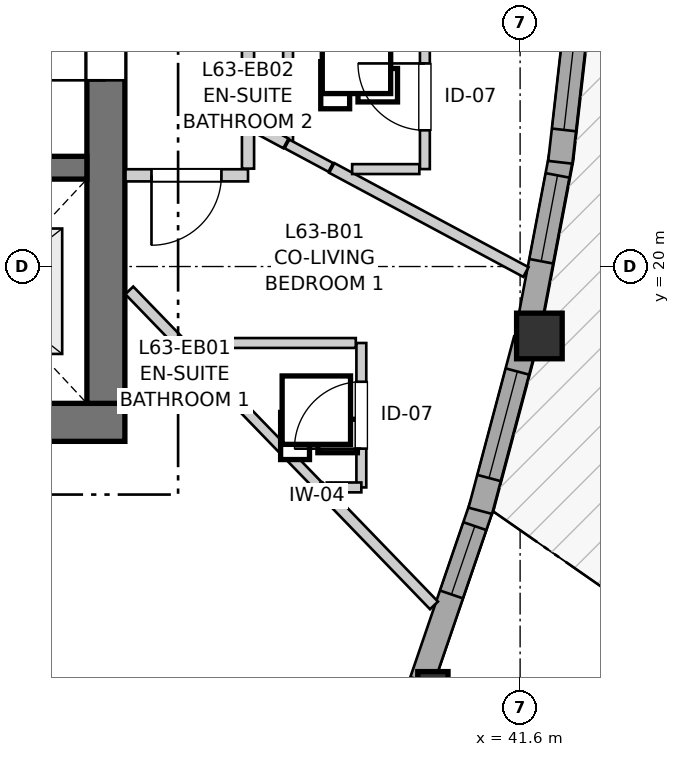
"""IFC4 building model, lengths in metres.
Left out: names, types, materials, properties, quantities, classifications, styles, units other than length and angle.
Written with IfcOpenShell. Run it as: python <this file> out.ifc"""

import sys

from ifc_helpers import new_model, si_unit, direction, frame, frame_2d, origin, origin_2d, place, context, subcontext, project, spatial, rectangle, i_section, extrude, source, transform, mapped, element, fill, save


model = new_model("IFC4")
c1 = context("Model", 3, precision=1e-05, world=origin(), true_north=direction((0.0, 1.0)))
c2 = subcontext(c1, "Body", "Model", "MODEL_VIEW")
j1 = project(units=[si_unit("LENGTHUNIT", "METRE"), si_unit("PLANEANGLEUNIT", "RADIAN")], contexts=[c1])
p1 = place(None, origin())
s1 = spatial("IfcSite", under=j1, at=p1, CompositionType="ELEMENT")
p2 = place(p1, origin())
s2 = spatial("IfcBuilding", under=s1, at=p2, CompositionType="ELEMENT")
p3 = place(p2, frame((0.0, 0.0, 211.6)))
s3 = spatial("IfcBuildingStorey", under=s2, at=p3, CompositionType="ELEMENT", Elevation=211.6)
p4 = place(p3, frame((24.3, 17.95, 0.0), z_axis=(0.0, 0.0, 1.0), x_axis=(1.0, 0.0, 0.0)))
e1 = element("IfcWall", 1, at=p4, inside=s3, PredefinedType="SHEAR", context=c2, shape_type="SweptSolid", body=[
    extrude(rectangle(XDim=12.1, YDim=0.5, at=frame_2d((6.05, 0.0))), origin(), (0.0, 0.0, 1.0), 2.96),
])
p5 = place(p3, frame((36.15, 18.2, 0.0), z_axis=(0.0, 0.0, 1.0), x_axis=(0.0, 1.0, 0.0)))
e2 = element("IfcWall", 2, at=p5, inside=s3, PredefinedType="SHEAR", context=c2, shape_type="SweptSolid", body=[
    extrude(rectangle(XDim=15.6, YDim=0.5, at=frame_2d((7.8, 0.0))), origin(), (0.0, 0.0, 1.0), 2.96),
])
p6 = place(p5, frame((4.25, 0.0, 0.0)))
e3 = element("IfcOpeningElement", 3, at=p6, cuts=e2, PredefinedType="OPENING", context=c2, shape_type="SweptSolid", body=[
    extrude(rectangle(XDim=1.1, YDim=2.15, at=frame_2d((0.55, 1.075))), frame((0.0, 0.26, 0.0), z_axis=(0.0, -1.0, 0.0), x_axis=(1.0, 0.0, 0.0)), (0.0, 0.0, 1.0), 0.52),
])
p7 = place(p5, frame((10.25, 0.0, 0.0)))
e4 = element("IfcOpeningElement", 4, at=p7, cuts=e2, PredefinedType="OPENING", context=c2, shape_type="SweptSolid", body=[
    extrude(rectangle(XDim=1.1, YDim=2.15, at=frame_2d((0.55, 1.075))), frame((0.0, 0.26, 0.0), z_axis=(0.0, -1.0, 0.0), x_axis=(1.0, 0.0, 0.0)), (0.0, 0.0, 1.0), 0.52),
])
p8 = place(p3, frame((24.8, 21.3, 0.0), z_axis=(0.0, 0.0, 1.0), x_axis=(1.0, 0.0, 0.0)))
e5 = element("IfcWall", 5, at=p8, inside=s3, PredefinedType="SHEAR", context=c2, shape_type="SweptSolid", body=[
    extrude(rectangle(XDim=11.1, YDim=0.3, at=frame_2d((5.55, 0.0))), origin(), (0.0, 0.0, 1.0), 2.96),
])
p9 = place(p8, frame((6.22, 0.0, 0.0)))
e6 = element("IfcOpeningElement", 6, at=p9, cuts=e5, PredefinedType="OPENING", context=c2, shape_type="SweptSolid", body=[
    extrude(rectangle(XDim=0.98, YDim=2.15, at=frame_2d((0.49, 1.075))), frame((0.0, 0.16, 0.0), z_axis=(0.0, -1.0, 0.0), x_axis=(1.0, 0.0, 0.0)), (0.0, 0.0, 1.0), 0.32),
])
p10 = place(p8, frame((9.15, 0.0, 0.0)))
e7 = element("IfcOpeningElement", 7, at=p10, cuts=e5, PredefinedType="OPENING", context=c2, shape_type="SweptSolid", body=[
    extrude(rectangle(XDim=1.15, YDim=2.15, at=frame_2d((0.575, 1.075))), frame((0.0, 0.16, 0.0), z_axis=(0.0, -1.0, 0.0), x_axis=(1.0, 0.0, 0.0)), (0.0, 0.0, 1.0), 0.32),
])
m1 = source(origin(), c2, "Body", "SweptSolid", [
    extrude(i_section(OverallWidth=0.398, OverallDepth=0.387, WebThickness=0.019, FlangeThickness=0.03, FilletRadius=0.015, at=origin_2d()), origin(), (0.0, 0.0, 1.0), 2.96),
])
p11 = place(p3, frame((40.452, 14.478, 0.0), z_axis=(0.0, 0.0, 1.0), x_axis=(1.0, 0.0, 0.0)))
e8 = element("IfcColumn", 8, at=p11, inside=s3, PredefinedType="PILASTER", context=c2, shape_type="MappedRepresentation", body=[
    mapped(m1, transform((0.0, 0.0, 0.0), x_axis=(1.0, 0.0, 0.0), y_axis=(0.0, 1.0, 0.0), z_axis=(0.0, 0.0, 1.0), scale=1.0)),
])
m2 = source(origin(), c2, "Body", "SweptSolid", [
    extrude(rectangle(XDim=0.6, YDim=0.6, at=origin_2d()), origin(), (0.0, 0.0, 1.0), 2.96),
])
p12 = place(p3, frame((41.854, 19.086, 0.0), z_axis=(0.0, 0.0, 1.0), x_axis=(1.0, 0.0, 0.0)))
e9 = element("IfcColumn", 9, at=p12, inside=s3, PredefinedType="COLUMN", context=c2, shape_type="MappedRepresentation", body=[
    mapped(m2, transform((0.0, 0.0, 0.0), x_axis=(1.0, 0.0, 0.0), y_axis=(0.0, 1.0, 0.0), z_axis=(0.0, 0.0, 1.0), scale=1.0)),
])
p13 = place(p3, frame((40.308, 14.548, 0.0), z_axis=(0.0, 0.0, 1.0), x_axis=(0.323591564922, 0.946196860654, 0.0)))
e10 = element("IfcWall", 10, at=p13, inside=s3, PredefinedType="SOLIDWALL", context=c2, shape_type="SweptSolid", body=[
    extrude(rectangle(XDim=2.454, YDim=0.32, at=frame_2d((1.227, 0.0))), origin(), (0.0, 0.0, 1.0), 2.58),
])
p14 = place(p13, frame((1.202, 0.0, 0.82)))
e11 = element("IfcOpeningElement", 11, at=p14, cuts=e10, PredefinedType="OPENING", context=c2, shape_type="SweptSolid", body=[
    extrude(rectangle(XDim=0.95, YDim=1.35, at=frame_2d((0.475, 0.675))), frame((0.0, 0.17, 0.0), z_axis=(0.0, -1.0, 0.0), x_axis=(1.0, 0.0, 0.0)), (0.0, 0.0, 1.0), 0.34),
])
p15 = place(p3, frame((41.076, 16.786, 0.0), z_axis=(0.0, 0.0, 1.0), x_axis=(0.257037260973, 0.966401493413, 0.0)))
e12 = element("IfcWall", 12, at=p15, inside=s3, PredefinedType="SOLIDWALL", context=c2, shape_type="SweptSolid", body=[
    extrude(rectangle(XDim=2.333, YDim=0.32, at=frame_2d((1.167, 0.0))), origin(), (0.0, 0.0, 1.0), 2.58),
])
p16 = place(p15, frame((0.446, 0.0, 0.82)))
e13 = element("IfcOpeningElement", 13, at=p16, cuts=e12, PredefinedType="OPENING", context=c2, shape_type="SweptSolid", body=[
    extrude(rectangle(XDim=1.45, YDim=1.25, at=frame_2d((0.725, 0.625))), frame((0.0, 0.17, 0.0), z_axis=(0.0, -1.0, 0.0), x_axis=(1.0, 0.0, 0.0)), (0.0, 0.0, 1.0), 0.34),
])
p17 = place(p3, frame((41.713, 19.205, 0.0), z_axis=(0.0, 0.0, 1.0), x_axis=(0.186691464441, 0.982418595663, 0.0)))
e14 = element("IfcWall", 14, at=p17, inside=s3, PredefinedType="SOLIDWALL", context=c2, shape_type="SweptSolid", body=[
    extrude(rectangle(XDim=2.294, YDim=0.32, at=frame_2d((1.147, 0.0))), origin(), (0.0, 0.0, 1.0), 2.58),
])
p18 = place(p17, frame((0.88, 0.0, 0.82)))
e15 = element("IfcOpeningElement", 15, at=p18, cuts=e14, PredefinedType="OPENING", context=c2, shape_type="SweptSolid", body=[
    extrude(rectangle(XDim=1.15, YDim=1.2, at=frame_2d((0.575, 0.6))), frame((0.0, 0.17, 0.0), z_axis=(0.0, -1.0, 0.0), x_axis=(1.0, 0.0, 0.0)), (0.0, 0.0, 1.0), 0.34),
])
p19 = place(p3, frame((42.128, 21.371, 0.0), z_axis=(0.0, 0.0, 1.0), x_axis=(0.113319777802, 0.993558567956, 0.0)))
e16 = element("IfcWall", 16, at=p19, inside=s3, PredefinedType="SOLIDWALL", context=c2, shape_type="SweptSolid", body=[
    extrude(rectangle(XDim=2.338, YDim=0.32, at=frame_2d((1.169, 0.0))), origin(), (0.0, 0.0, 1.0), 2.58),
])
p20 = place(p19, frame((0.429, 0.0, 0.82)))
e17 = element("IfcOpeningElement", 17, at=p20, cuts=e16, PredefinedType="OPENING", context=c2, shape_type="SweptSolid", body=[
    extrude(rectangle(XDim=1.5, YDim=1.45, at=frame_2d((0.75, 0.725))), frame((0.0, 0.17, 0.0), z_axis=(0.0, -1.0, 0.0), x_axis=(1.0, 0.0, 0.0)), (0.0, 0.0, 1.0), 0.34),
])
p21 = place(p3, frame((38.02, 25.733, 0.0), z_axis=(0.0, 0.0, 1.0), x_axis=(0.0, -1.0, 0.0)))
e18 = element("IfcWall", 18, at=p21, inside=s3, PredefinedType="PARTITIONING", context=c2, shape_type="SweptSolid", body=[
    extrude(rectangle(XDim=3.862, YDim=0.16, at=frame_2d((1.931, 0.0))), origin(), (0.0, 0.0, 1.0), 2.96),
])
p22 = place(p21, frame((1.47, 0.0, 0.0)))
e19 = element("IfcOpeningElement", 19, at=p22, cuts=e18, PredefinedType="OPENING", context=c2, shape_type="SweptSolid", body=[
    extrude(rectangle(XDim=0.92, YDim=2.1, at=frame_2d((0.46, 1.05))), frame((0.0, 0.09, 0.0), z_axis=(0.0, -1.0, 0.0), x_axis=(1.0, 0.0, 0.0)), (0.0, 0.0, 1.0), 0.18),
])
p23 = place(p3, frame((39.511, 17.094, 0.0), z_axis=(0.0, 0.0, 1.0), x_axis=(0.0, 1.0, 0.0)))
e20 = element("IfcWall", 20, at=p23, inside=s3, PredefinedType="PARTITIONING", context=c2, shape_type="SweptSolid", body=[
    extrude(rectangle(XDim=1.9, YDim=0.13, at=frame_2d((0.95, 0.0))), origin(), (0.0, 0.0, 1.0), 2.96),
])
p24 = place(p23, frame((0.51, 0.0, 0.0)))
e21 = element("IfcOpeningElement", 21, at=p24, cuts=e20, PredefinedType="OPENING", context=c2, shape_type="SweptSolid", body=[
    extrude(rectangle(XDim=0.88, YDim=2.05, at=frame_2d((0.44, 1.025))), frame((0.0, 0.075, 0.0), z_axis=(0.0, -1.0, 0.0), x_axis=(1.0, 0.0, 0.0)), (0.0, 0.0, 1.0), 0.15),
])
p25 = place(p3, frame((40.347, 21.282, 0.0), z_axis=(0.0, 0.0, 1.0), x_axis=(0.0, 1.0, 0.0)))
e22 = element("IfcWall", 22, at=p25, inside=s3, PredefinedType="PARTITIONING", context=c2, shape_type="SweptSolid", body=[
    extrude(rectangle(XDim=1.9, YDim=0.13, at=frame_2d((0.95, 0.0))), origin(), (0.0, 0.0, 1.0), 2.598),
])
p26 = place(p25, frame((0.51, 0.0, 0.0)))
e23 = element("IfcOpeningElement", 23, at=p26, cuts=e22, PredefinedType="OPENING", context=c2, shape_type="SweptSolid", body=[
    extrude(rectangle(XDim=0.88, YDim=2.05, at=frame_2d((0.44, 1.025))), frame((0.0, 0.075, 0.0), z_axis=(0.0, -1.0, 0.0), x_axis=(1.0, 0.0, 0.0)), (0.0, 0.0, 1.0), 0.15),
])
p27 = place(p3, frame((38.02, 21.2, 0.0), z_axis=(0.0, 0.0, 1.0), x_axis=(-1.0, 0.0, 0.0)))
e24 = element("IfcWall", 24, at=p27, inside=s3, PredefinedType="PARTITIONING", context=c2, shape_type="SweptSolid", body=[
    extrude(rectangle(XDim=1.612, YDim=0.16, at=frame_2d((0.806, 0.0))), origin(), (0.0, 0.0, 1.0), 2.96),
])
p28 = place(p27, frame((0.35, 0.0, 0.0)))
e25 = element("IfcOpeningElement", 25, at=p28, cuts=e24, PredefinedType="OPENING", context=c2, shape_type="SweptSolid", body=[
    extrude(rectangle(XDim=0.92, YDim=2.1, at=frame_2d((0.46, 1.05))), frame((0.0, 0.09, 0.0), z_axis=(0.0, -1.0, 0.0), x_axis=(1.0, 0.0, 0.0)), (0.0, 0.0, 1.0), 0.18),
])
p29 = place(p3, frame((39.122, 21.297, 0.0), z_axis=(0.0, 0.0, 1.0), x_axis=(0.881308328415, -0.472541670402, 0.0)))
e26 = element("IfcWall", 26, at=p29, inside=s3, PredefinedType="PARTITIONING", context=c2, shape_type="SweptSolid", body=[
    extrude(rectangle(XDim=2.898, YDim=0.145, at=frame_2d((1.449, 0.0))), origin(), (0.0, 0.0, 1.0), 2.96),
])
p30 = place(p3, frame((38.951, 17.109, 0.0), z_axis=(0.0, 0.0, 1.0), x_axis=(0.695195716836, -0.718820502833, 0.0)))
e27 = element("IfcWall", 27, at=p30, inside=s3, PredefinedType="PARTITIONING", context=c2, shape_type="SweptSolid", body=[
    extrude(rectangle(XDim=2.18, YDim=0.145, at=frame_2d((1.09, 0.0))), origin(), (0.0, 0.0, 1.0), 2.96),
])
p31 = place(p3, frame((36.458, 19.686, 0.0), z_axis=(0.0, 0.0, 1.0), x_axis=(0.695231916786, -0.718785490868, 0.0)))
e28 = element("IfcWall", 28, at=p31, inside=s3, PredefinedType="PARTITIONING", context=c2, shape_type="SweptSolid", body=[
    extrude(rectangle(XDim=1.824, YDim=0.145, at=frame_2d((0.912, 0.0))), origin(), (0.0, 0.0, 1.0), 2.96),
])
p32 = place(p3, frame((37.711, 18.994, 0.0), z_axis=(0.0, 0.0, 1.0), x_axis=(1.0, 0.0, 0.0)))
e29 = element("IfcWall", 29, at=p32, inside=s3, PredefinedType="PARTITIONING", context=c2, shape_type="SweptSolid", body=[
    extrude(rectangle(XDim=1.727, YDim=0.13, at=frame_2d((0.864, 0.0))), origin(), (0.0, 0.0, 1.0), 2.96),
])
p33 = place(p3, frame((37.736, 18.364, 0.0), z_axis=(0.0, 0.0, 1.0), x_axis=(0.695451956037, -0.718572596781, 0.0)))
e30 = element("IfcWall", 30, at=p33, inside=s3, PredefinedType="PARTITIONING", context=c2, shape_type="SweptSolid", body=[
    extrude(rectangle(XDim=1.732, YDim=0.13, at=frame_2d((0.866, 0.0))), origin(), (0.0, 0.0, 1.0), 2.96),
])
p34 = place(p3, frame((38.547, 21.605, 0.0), z_axis=(0.0, 0.0, 1.0), x_axis=(0.0, 1.0, 0.0)))
e31 = element("IfcWall", 31, at=p34, inside=s3, PredefinedType="PARTITIONING", context=c2, shape_type="SweptSolid", body=[
    extrude(rectangle(XDim=1.504, YDim=0.13, at=frame_2d((0.752, 0.0))), origin(), (0.0, 0.0, 1.0), 2.628),
])
p35 = place(p3, frame((39.39, 21.282, 0.0), z_axis=(0.0, 0.0, 1.0), x_axis=(1.0, 0.0, 0.0)))
e32 = element("IfcWall", 32, at=p35, inside=s3, PredefinedType="PARTITIONING", context=c2, shape_type="SweptSolid", body=[
    extrude(rectangle(XDim=0.884, YDim=0.13, at=frame_2d((0.442, 0.0))), origin(), (0.0, 0.0, 1.0), 2.96),
])
p36 = place(p3, frame((38.02, 21.288, 0.0), z_axis=(0.0, 0.0, 1.0), x_axis=(0.0, 1.0, 0.0)))
e33 = element("IfcWall", 33, at=p36, inside=s3, PredefinedType="PARTITIONING", context=c2, shape_type="SweptSolid", body=[
    extrude(rectangle(XDim=0.568, YDim=0.16, at=frame_2d((0.284, 0.0))), origin(), (0.0, 0.0, 1.0), 2.96),
])
p37 = place(p3, frame((38.532, 21.613, 0.0), z_axis=(0.0, 0.0, 1.0), x_axis=(0.881618593919, -0.471962556626, 0.0)))
e34 = element("IfcWall", 34, at=p37, inside=s3, PredefinedType="PARTITIONING", context=c2, shape_type="SweptSolid", body=[
    extrude(rectangle(XDim=0.654, YDim=0.13, at=frame_2d((0.327, 0.0))), origin(), (0.0, 0.0, 1.0), 2.96),
])
p38 = place(p3, frame((37.711, 18.571, 0.0), z_axis=(0.0, 0.0, 1.0), x_axis=(0.0, 1.0, 0.0)))
e35 = element("IfcWall", 35, at=p38, inside=s3, PredefinedType="PARTITIONING", context=c2, shape_type="SweptSolid", body=[
    extrude(rectangle(XDim=0.35, YDim=0.13, at=frame_2d((0.175, 0.0))), origin(), (0.0, 0.0, 1.0), 2.96),
])
p39 = place(p3, frame((38.06, 21.867, 0.0), z_axis=(0.0, 0.0, 1.0), x_axis=(0.881026965879, -0.473066047601, 0.0)))
e36 = element("IfcWall", 36, at=p39, inside=s3, PredefinedType="PARTITIONING", context=c2, shape_type="SweptSolid", body=[
    extrude(rectangle(XDim=0.521, YDim=0.145, at=frame_2d((0.261, 0.0))), origin(), (0.0, 0.0, 1.0), 2.96),
])
p40 = place(p3, frame((39.056, 17.094, 0.0), z_axis=(0.0, 0.0, 1.0), x_axis=(1.0, 0.0, 0.0)))
e37 = element("IfcWall", 37, at=p40, inside=s3, PredefinedType="PARTITIONING", context=c2, shape_type="SweptSolid", body=[
    extrude(rectangle(XDim=0.455, YDim=0.13, at=frame_2d((0.228, 0.0))), origin(), (0.0, 0.0, 1.0), 2.96),
])
m3 = source(origin(), c2, "Body", "SweptSolid", [
    extrude(rectangle(XDim=0.95, YDim=1.35, at=frame_2d((0.475, 0.675))), frame((0.0, 0.03, 0.0), z_axis=(0.0, -1.0, 0.0), x_axis=(1.0, 0.0, 0.0)), (0.0, 0.0, 1.0), 0.06),
])
p41 = place(p14, origin())
e38 = element("IfcWindow", 38, at=p41, inside=s3, PartitioningType="SINGLE_PANEL", PredefinedType="WINDOW", context=c2, shape_type="MappedRepresentation", body=[
    mapped(m3, transform((0.0, 0.0, 0.0), x_axis=(1.0, 0.0, 0.0), y_axis=(0.0, 1.0, 0.0), z_axis=(0.0, 0.0, 1.0), scale=1.0)),
])
fill(e11, e38)
m4 = source(origin(), c2, "Body", "SweptSolid", [
    extrude(rectangle(XDim=1.45, YDim=1.25, at=frame_2d((0.725, 0.625))), frame((0.0, 0.03, 0.0), z_axis=(0.0, -1.0, 0.0), x_axis=(1.0, 0.0, 0.0)), (0.0, 0.0, 1.0), 0.06),
])
p42 = place(p16, origin())
e39 = element("IfcWindow", 39, at=p42, inside=s3, PartitioningType="SINGLE_PANEL", PredefinedType="WINDOW", context=c2, shape_type="MappedRepresentation", body=[
    mapped(m4, transform((0.0, 0.0, 0.0), x_axis=(1.0, 0.0, 0.0), y_axis=(0.0, 1.0, 0.0), z_axis=(0.0, 0.0, 1.0), scale=1.0)),
])
fill(e13, e39)
m5 = source(origin(), c2, "Body", "SweptSolid", [
    extrude(rectangle(XDim=1.15, YDim=1.2, at=frame_2d((0.575, 0.6))), frame((0.0, 0.03, 0.0), z_axis=(0.0, -1.0, 0.0), x_axis=(1.0, 0.0, 0.0)), (0.0, 0.0, 1.0), 0.06),
])
p43 = place(p18, origin())
e40 = element("IfcWindow", 40, at=p43, inside=s3, PartitioningType="SINGLE_PANEL", PredefinedType="WINDOW", context=c2, shape_type="MappedRepresentation", body=[
    mapped(m5, transform((0.0, 0.0, 0.0), x_axis=(1.0, 0.0, 0.0), y_axis=(0.0, 1.0, 0.0), z_axis=(0.0, 0.0, 1.0), scale=1.0)),
])
fill(e15, e40)
m6 = source(origin(), c2, "Body", "SweptSolid", [
    extrude(rectangle(XDim=1.5, YDim=1.45, at=frame_2d((0.75, 0.725))), frame((0.0, 0.03, 0.0), z_axis=(0.0, -1.0, 0.0), x_axis=(1.0, 0.0, 0.0)), (0.0, 0.0, 1.0), 0.06),
])
p44 = place(p20, origin())
e41 = element("IfcWindow", 41, at=p44, inside=s3, PartitioningType="SINGLE_PANEL", PredefinedType="WINDOW", context=c2, shape_type="MappedRepresentation", body=[
    mapped(m6, transform((0.0, 0.0, 0.0), x_axis=(1.0, 0.0, 0.0), y_axis=(0.0, 1.0, 0.0), z_axis=(0.0, 0.0, 1.0), scale=1.0)),
])
fill(e17, e41)
m7 = source(origin(), c2, "Body", "SweptSolid", [
    extrude(rectangle(XDim=1.1, YDim=2.15, at=frame_2d((0.55, 1.075))), frame((0.0, 0.025, 0.0), z_axis=(0.0, -1.0, 0.0), x_axis=(1.0, 0.0, 0.0)), (0.0, 0.0, 1.0), 0.05),
])
p45 = place(p6, origin())
e42 = element("IfcDoor", 42, at=p45, inside=s3, OperationType="SINGLE_SWING_LEFT", PredefinedType="DOOR", context=c2, shape_type="MappedRepresentation", body=[
    mapped(m7, transform((0.0, 0.0, 0.0), x_axis=(1.0, 0.0, 0.0), y_axis=(0.0, 1.0, 0.0), z_axis=(0.0, 0.0, 1.0), scale=1.0)),
])
fill(e3, e42)
m8 = source(origin(), c2, "Body", "SweptSolid", [
    extrude(rectangle(XDim=0.88, YDim=2.05, at=frame_2d((0.44, 1.025))), frame((0.0, 0.025, 0.0), z_axis=(0.0, -1.0, 0.0), x_axis=(1.0, 0.0, 0.0)), (0.0, 0.0, 1.0), 0.05),
])
p46 = place(p24, origin())
e43 = element("IfcDoor", 43, at=p46, inside=s3, OperationType="SINGLE_SWING_LEFT", PredefinedType="DOOR", context=c2, shape_type="MappedRepresentation", body=[
    mapped(m8, transform((0.0, 0.0, 0.0), x_axis=(1.0, 0.0, 0.0), y_axis=(0.0, 1.0, 0.0), z_axis=(0.0, 0.0, 1.0), scale=1.0)),
])
fill(e21, e43)
p47 = place(p26, origin())
e44 = element("IfcDoor", 44, at=p47, inside=s3, OperationType="SINGLE_SWING_RIGHT", PredefinedType="DOOR", context=c2, shape_type="MappedRepresentation", body=[
    mapped(m8, transform((0.0, 0.0, 0.0), x_axis=(1.0, 0.0, 0.0), y_axis=(0.0, 1.0, 0.0), z_axis=(0.0, 0.0, 1.0), scale=1.0)),
])
fill(e23, e44)
m9 = source(origin(), c2, "Body", "SweptSolid", [
    extrude(rectangle(XDim=0.92, YDim=2.1, at=frame_2d((0.46, 1.05))), frame((0.0, 0.025, 0.0), z_axis=(0.0, -1.0, 0.0), x_axis=(1.0, 0.0, 0.0)), (0.0, 0.0, 1.0), 0.05),
])
p48 = place(p28, origin())
e45 = element("IfcDoor", 45, at=p48, inside=s3, OperationType="SINGLE_SWING_RIGHT", PredefinedType="DOOR", context=c2, shape_type="MappedRepresentation", body=[
    mapped(m9, transform((0.0, 0.0, 0.0), x_axis=(1.0, 0.0, 0.0), y_axis=(0.0, 1.0, 0.0), z_axis=(0.0, 0.0, 1.0), scale=1.0)),
])
fill(e25, e45)
save(model, sys.argv[1])
